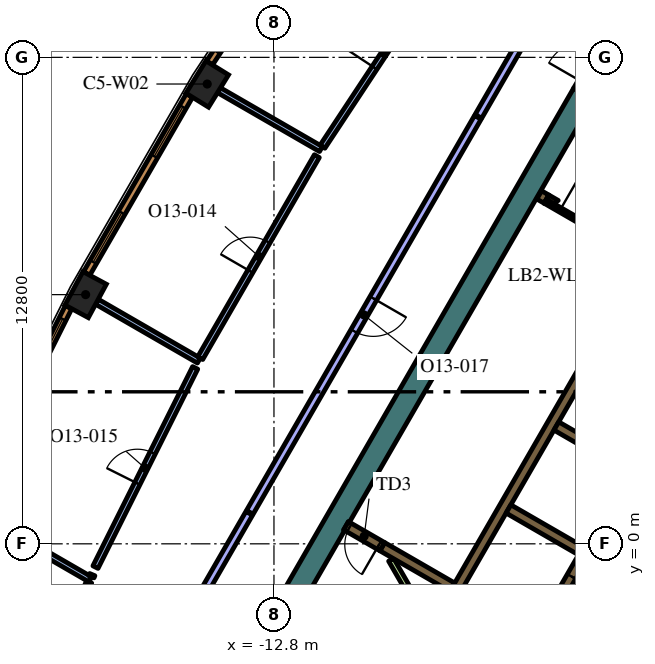
"""IFC4 building model, lengths in metres.
Left out: names, types, materials, properties, quantities, classifications, styles, units other than length and angle.
Written with IfcOpenShell. Run it as: python <this file> out.ifc"""

import sys

from ifc_helpers import new_model, si_unit, direction, frame, frame_2d, origin, origin_2d, place, context, subcontext, project, spatial, polyline, rectangle, outline, extrude, element, fill, save


model = new_model("IFC4")
c1 = context("Model", 3, precision=1e-05, world=origin(), true_north=direction((0.0, 1.0)))
c2 = subcontext(c1, "Body", "Model", "MODEL_VIEW")
j1 = project(units=[si_unit("LENGTHUNIT", "METRE"), si_unit("PLANEANGLEUNIT", "RADIAN")], contexts=[c1])
p1 = place(None, origin())
s1 = spatial("IfcSite", under=j1, at=p1, CompositionType="ELEMENT")
p2 = place(p1, origin())
s2 = spatial("IfcBuilding", under=s1, at=p2, CompositionType="ELEMENT")
p3 = place(p2, frame((0.0, 0.0, 292.2)))
s3 = spatial("IfcBuildingStorey", under=s2, at=p3, CompositionType="ELEMENT", Elevation=292.2)
for number, where, z_axis, x_axis in (
    (1, (-14.556, 12.098, 0.0), (0.0, 0.0, 1.0), (-0.526, -0.851, 0.0)),
    (2, (-17.756, 6.557, 0.0), (0.0, 0.0, 1.0), (-0.474, -0.881, 0.0)),
):
    element("IfcColumn", number, at=place(p3, frame(where, z_axis=z_axis, x_axis=x_axis)), inside=s3, PredefinedType="COLUMN", context=c2, shape_type="SweptSolid", body=[
        extrude(rectangle(XDim=1.0, YDim=0.7, at=origin_2d()), origin(), (0.0, 0.0, 1.0), 4.2),
    ])
p4 = place(p3, origin())
e3 = element("IfcWall", 3, at=p4, inside=s3, PredefinedType="SOLIDWALL", context=c2, shape_type="SweptSolid", body=[
    extrude(outline(polyline([(-15.502, -6.35), (-4.912, 11.992), (-4.393, 11.692), (-10.815, 0.569), (-10.84, 0.583), (-10.84, 0.583), (-10.84, 0.583), (-10.965, 0.367), (-10.965, 0.367), (-10.965, 0.367), (-10.94, 0.352), (-11.033, 0.191), (-14.809, -6.35), (-15.156, -6.95), (-15.502, -6.35)])), origin(), (0.0, 0.0, 1.0), 4.2),
])
p5 = place(p3, frame((-8.06, -1.311, 0.0), z_axis=(0.0, 0.0, 1.0), x_axis=(0.50000273126, 0.866023826885, 0.0)))
e4 = element("IfcWall", 4, at=p5, inside=s3, PredefinedType="SOLIDWALL", context=c2, shape_type="SweptSolid", body=[
    extrude(rectangle(XDim=10.33, YDim=0.25, at=frame_2d((5.165, 0.0))), origin(), (0.0, 0.0, 1.0), 4.2),
])
for number, where, z_axis, x_axis in (
    (5, (-5.369, 3.1, 0.0), (0.0, 0.0, 1.0), (0.866, -0.5, 0.0)),
    (6, (-4.724, -0.182, 0.0), (0.0, 0.0, 1.0), (-0.866, 0.5, 0.0)),
):
    element("IfcWall", number, at=place(p3, frame(where, z_axis=z_axis, x_axis=x_axis)), inside=s3, PredefinedType="SOLIDWALL", context=c2, shape_type="SweptSolid", body=[
        extrude(rectangle(XDim=2.2, YDim=0.25, at=frame_2d((1.1, 0.0))), origin(), (0.0, 0.0, 1.0), 4.2),
    ])
p6 = place(p3, frame((-9.95, -0.075, 0.0), z_axis=(0.0, 0.0, 1.0), x_axis=(0.865962177421, -0.500109495288, 0.0)))
e7 = element("IfcWall", 7, at=p6, inside=s3, PredefinedType="SOLIDWALL", context=c2, shape_type="SweptSolid", body=[
    extrude(rectangle(XDim=2.129, YDim=0.25, at=frame_2d((1.065, 0.0))), origin(), (0.0, 0.0, 1.0), 4.2),
])
p7 = place(p3, frame((-5.629, 9.07, 0.0), z_axis=(0.0, 0.0, 1.0), x_axis=(-0.866185586049, 0.49972245349, 0.0)))
e8 = element("IfcWall", 8, at=p7, inside=s3, PredefinedType="SOLIDWALL", context=c2, shape_type="SweptSolid", body=[
    extrude(rectangle(XDim=0.22, YDim=0.25, at=frame_2d((0.11, 0.0))), origin(), (0.0, 0.0, 1.0), 4.2),
])
e9 = element("IfcWall", 9, at=p4, inside=s3, PredefinedType="SOLIDWALL", context=c2, shape_type="SweptSolid", body=[
    extrude(outline(polyline([(-5.689, 8.96), (-5.69, 8.961), (-5.565, 9.177), (-5.319, 9.035), (-5.335, 9.026), (-5.351, 9.015), (-5.366, 9.002), (-5.379, 8.988), (-5.392, 8.972), (-5.402, 8.956), (-5.412, 8.939), (-5.629, 9.064), (-5.629, 9.064), (-5.689, 8.96)])), origin(), (0.0, 0.0, 1.0), 4.2),
])
p8 = place(p3, frame((-9.718, -0.417, 0.0), z_axis=(0.0, 0.0, 1.0), x_axis=(0.499966538646, -0.866044721844, 0.0)))
e10 = element("IfcWall", 10, at=p8, inside=s3, PredefinedType="PARTITIONING", context=c2, shape_type="SweptSolid", body=[
    extrude(rectangle(XDim=2.511, YDim=0.15, at=frame_2d((1.255, 0.0))), origin(), (0.0, 0.0, 1.0), 3.55),
])
p9 = place(p3, frame((-0.898, 6.194, 0.0), z_axis=(0.0, 0.0, 1.0), x_axis=(-0.499996202215, -0.866027596426, 0.0)))
e11 = element("IfcWall", 11, at=p9, inside=s3, PredefinedType="SOLIDWALL", context=c2, shape_type="SweptSolid", body=[
    extrude(rectangle(XDim=9.83, YDim=0.25, at=frame_2d((4.915, 0.0))), origin(), (0.0, 0.0, 1.0), 4.2),
])
p10 = place(p9, frame((0.585, 0.0, 0.0)))
e12 = element("IfcOpeningElement", 12, at=p10, cuts=e11, PredefinedType="OPENING", context=c2, shape_type="SweptSolid", body=[
    extrude(rectangle(XDim=1.1, YDim=2.1, at=frame_2d((0.55, 1.05))), frame((0.0, 0.135, 0.0), z_axis=(0.0, -1.0, 0.0), x_axis=(1.0, 0.0, 0.0)), (0.0, 0.0, 1.0), 0.27),
])
p11 = place(p9, frame((3.105, 0.0, 0.0)))
e13 = element("IfcOpeningElement", 13, at=p11, cuts=e11, PredefinedType="OPENING", context=c2, shape_type="SweptSolid", body=[
    extrude(rectangle(XDim=1.1, YDim=2.1, at=frame_2d((0.55, 1.05))), frame((0.0, 0.135, 0.0), z_axis=(0.0, -1.0, 0.0), x_axis=(1.0, 0.0, 0.0)), (0.0, 0.0, 1.0), 0.27),
])
p12 = place(p9, frame((5.625, 0.0, 0.0)))
e14 = element("IfcOpeningElement", 14, at=p12, cuts=e11, PredefinedType="OPENING", context=c2, shape_type="SweptSolid", body=[
    extrude(rectangle(XDim=1.1, YDim=2.1, at=frame_2d((0.55, 1.05))), frame((0.0, 0.135, 0.0), z_axis=(0.0, -1.0, 0.0), x_axis=(1.0, 0.0, 0.0)), (0.0, 0.0, 1.0), 0.27),
])
p13 = place(p9, frame((8.145, 0.0, 0.0)))
e15 = element("IfcOpeningElement", 15, at=p13, cuts=e11, PredefinedType="OPENING", context=c2, shape_type="SweptSolid", body=[
    extrude(rectangle(XDim=1.1, YDim=2.1, at=frame_2d((0.55, 1.05))), frame((0.0, 0.135, 0.0), z_axis=(0.0, -1.0, 0.0), x_axis=(1.0, 0.0, 0.0)), (0.0, 0.0, 1.0), 0.27),
])
p14 = place(p3, frame((-5.659, 9.012, 0.0), z_axis=(0.0, 0.0, 1.0), x_axis=(0.866009402589, -0.500027713859, 0.0)))
e16 = element("IfcWall", 16, at=p14, inside=s3, PredefinedType="PARTITIONING", context=c2, shape_type="SweptSolid", body=[
    extrude(rectangle(XDim=2.1, YDim=0.12, at=frame_2d((1.05, 0.0))), origin(), (0.0, 0.0, 1.0), 3.55),
])
p15 = place(p14, frame((0.45, 0.0, 0.0)))
e17 = element("IfcOpeningElement", 17, at=p15, cuts=e16, PredefinedType="OPENING", context=c2, shape_type="SweptSolid", body=[
    extrude(rectangle(XDim=1.2, YDim=2.1, at=frame_2d((0.6, 1.05))), frame((0.0, 0.07, 0.0), z_axis=(0.0, -1.0, 0.0), x_axis=(1.0, 0.0, 0.0)), (0.0, 0.0, 1.0), 0.14),
])
p16 = place(p3, frame((-4.652, 11.842, 0.0), z_axis=(0.0, 0.0, 1.0), x_axis=(0.500062241894, 0.865989465428, 0.0)))
e18 = element("IfcWall", 18, at=p16, inside=s3, PredefinedType="SOLIDWALL", context=c2, shape_type="SweptSolid", body=[
    extrude(rectangle(XDim=1.7, YDim=0.6, at=frame_2d((0.85, 0.0))), origin(), (0.0, 0.0, 1.0), 4.2),
])
p17 = place(p16, frame((0.25, 0.0, 0.0)))
e19 = element("IfcOpeningElement", 19, at=p17, cuts=e18, PredefinedType="OPENING", context=c2, shape_type="SweptSolid", body=[
    extrude(rectangle(XDim=1.2, YDim=2.1, at=frame_2d((0.6, 1.05))), frame((0.0, 0.31, 0.0), z_axis=(0.0, -1.0, 0.0), x_axis=(1.0, 0.0, 0.0)), (0.0, 0.0, 1.0), 0.62),
])
p18 = place(p3, frame((-9.95, -0.075, 0.0), z_axis=(0.0, 0.0, 1.0), x_axis=(-0.865952669392, 0.500125958508, 0.0)))
e20 = element("IfcWall", 20, at=p18, inside=s3, PredefinedType="SOLIDWALL", context=c2, shape_type="SweptSolid", body=[
    extrude(rectangle(XDim=1.1, YDim=0.25, at=frame_2d((0.55, 0.0))), origin(), (0.0, 0.0, 1.0), 4.2),
])
p19 = place(p18, frame((0.1, 0.0, 0.0)))
e21 = element("IfcOpeningElement", 21, at=p19, cuts=e20, PredefinedType="OPENING", context=c2, shape_type="SweptSolid", body=[
    extrude(rectangle(XDim=0.9, YDim=2.1, at=frame_2d((0.45, 1.05))), frame((0.0, 0.135, 0.0), z_axis=(0.0, -1.0, 0.0), x_axis=(1.0, 0.0, 0.0)), (0.0, 0.0, 1.0), 0.27),
])
p20 = place(p3, frame((-11.564, 10.387, 0.0), z_axis=(0.0, 0.0, 1.0), x_axis=(-0.86604641216, 0.499963610661, 0.0)))
e22 = element("IfcWall", 22, at=p20, inside=s3, PredefinedType="PARTITIONING", context=c2, shape_type="SweptSolid", body=[
    extrude(rectangle(XDim=3.096, YDim=0.15, at=frame_2d((1.548, 0.0))), origin(), (0.0, 0.0, 1.0), 3.55),
])
p21 = place(p3, frame((-11.523, 10.449, 0.0), z_axis=(0.0, 0.0, 1.0), x_axis=(0.550751709023, 0.834669129061, 0.0)))
e23 = element("IfcWall", 23, at=p21, inside=s3, PredefinedType="PARTITIONING", context=c2, shape_type="SweptSolid", body=[
    extrude(rectangle(XDim=5.788, YDim=0.15, at=frame_2d((2.894, 0.0))), origin(), (0.0, 0.0, 1.0), 3.55),
])
p22 = place(p21, frame((2.488, 0.0, 0.0)))
e24 = element("IfcOpeningElement", 24, at=p22, cuts=e23, PredefinedType="OPENING", context=c2, shape_type="SweptSolid", body=[
    extrude(rectangle(XDim=0.9, YDim=2.1, at=frame_2d((0.45, 1.05))), frame((0.0, 0.085, 0.0), z_axis=(0.0, -1.0, 0.0), x_axis=(1.0, 0.0, 0.0)), (0.0, 0.0, 1.0), 0.17),
])
p23 = place(p3, frame((-14.777, 4.822, 0.0), z_axis=(0.0, 0.0, 1.0), x_axis=(-0.865992557167, 0.500056887695, 0.0)))
e25 = element("IfcWall", 25, at=p23, inside=s3, PredefinedType="PARTITIONING", context=c2, shape_type="SweptSolid", body=[
    extrude(rectangle(XDim=3.096, YDim=0.15, at=frame_2d((1.548, 0.0))), origin(), (0.0, 0.0, 1.0), 3.55),
])
p24 = place(p3, frame((-14.74, 4.887, 0.0), z_axis=(0.0, 0.0, 1.0), x_axis=(0.500007141444, 0.86602128063, 0.0)))
e26 = element("IfcWall", 26, at=p24, inside=s3, PredefinedType="PARTITIONING", context=c2, shape_type="SweptSolid", body=[
    extrude(rectangle(XDim=6.137, YDim=0.15, at=frame_2d((3.068, 0.0))), origin(), (0.0, 0.0, 1.0), 3.55),
])
p25 = place(p24, frame((2.637, 0.0, 0.0)))
e27 = element("IfcOpeningElement", 27, at=p25, cuts=e26, PredefinedType="OPENING", context=c2, shape_type="SweptSolid", body=[
    extrude(rectangle(XDim=0.9, YDim=2.1, at=frame_2d((0.45, 1.05))), frame((0.0, 0.085, 0.0), z_axis=(0.0, -1.0, 0.0), x_axis=(1.0, 0.0, 0.0)), (0.0, 0.0, 1.0), 0.17),
])
p26 = place(p3, frame((-17.635, -0.936, 0.0), z_axis=(0.0, 0.0, 1.0), x_axis=(-0.866044607523, 0.499966736674, 0.0)))
e28 = element("IfcWall", 28, at=p26, inside=s3, PredefinedType="PARTITIONING", context=c2, shape_type="SweptSolid", body=[
    extrude(rectangle(XDim=3.115, YDim=0.15, at=frame_2d((1.557, 0.0))), origin(), (0.0, 0.0, 1.0), 3.55),
])
p27 = place(p3, frame((-17.497, -0.613, 0.0), z_axis=(0.0, 0.0, 1.0), x_axis=(0.447480081559, 0.89429389834, 0.0)))
e29 = element("IfcWall", 29, at=p27, inside=s3, PredefinedType="PARTITIONING", context=c2, shape_type="SweptSolid", body=[
    extrude(rectangle(XDim=5.863, YDim=0.15, at=frame_2d((2.931, 0.0))), origin(), (0.0, 0.0, 1.0), 3.55),
])
p28 = place(p27, frame((2.463, 0.0, 0.0)))
e30 = element("IfcOpeningElement", 30, at=p28, cuts=e29, PredefinedType="OPENING", context=c2, shape_type="SweptSolid", body=[
    extrude(rectangle(XDim=0.9, YDim=2.1, at=frame_2d((0.45, 1.05))), frame((0.0, 0.085, 0.0), z_axis=(0.0, -1.0, 0.0), x_axis=(1.0, 0.0, 0.0)), (0.0, 0.0, 1.0), 0.17),
])
p29 = place(p3, frame((-17.581, -0.81, 0.0), z_axis=(0.0, 0.0, 1.0), x_axis=(-0.390033474923, -0.92080067791, 0.0)))
e31 = element("IfcWall", 31, at=p29, inside=s3, PredefinedType="PARTITIONING", context=c2, shape_type="SweptSolid", body=[
    extrude(rectangle(XDim=0.061, YDim=0.15, at=frame_2d((0.03, 0.0))), origin(), (0.0, 0.0, 1.0), 3.55),
])
p30 = place(p3, frame((-19.639, -5.62, 0.0), z_axis=(0.0, 0.0, 1.0), x_axis=(0.393349802257, 0.919388891092, 0.0)))
e32 = element("IfcWall", 32, at=p30, inside=s3, PredefinedType="PARTITIONING", context=c2, shape_type="SweptSolid", body=[
    extrude(rectangle(XDim=5.019, YDim=0.15, at=frame_2d((2.51, 0.0))), origin(), (0.0, 0.0, 1.0), 3.55),
])
p31 = place(p30, frame((2.019, 0.0, 0.0)))
e33 = element("IfcOpeningElement", 33, at=p31, cuts=e32, PredefinedType="OPENING", context=c2, shape_type="SweptSolid", body=[
    extrude(rectangle(XDim=0.9, YDim=2.1, at=frame_2d((0.45, 1.05))), frame((0.0, 0.085, 0.0), z_axis=(0.0, -1.0, 0.0), x_axis=(1.0, 0.0, 0.0)), (0.0, 0.0, 1.0), 0.17),
])
p32 = place(p3, frame((-7.436, 11.221, 0.0), z_axis=(0.0, 0.0, 1.0), x_axis=(-0.49999894854, -0.866026010844, 0.0)))
e34 = element("IfcWall", 34, at=p32, inside=s3, PredefinedType="PARTITIONING", context=c2, shape_type="SweptSolid", body=[
    extrude(rectangle(XDim=12.0, YDim=0.2, at=frame_2d((6.0, 0.0))), origin(), (0.0, 0.0, 1.0), 3.55),
])
p33 = place(p32, frame((5.5, 0.0, 0.0)))
e35 = element("IfcOpeningElement", 35, at=p33, cuts=e34, PredefinedType="OPENING", context=c2, shape_type="SweptSolid", body=[
    extrude(rectangle(XDim=1.0, YDim=2.1, at=frame_2d((0.5, 1.05))), frame((0.0, 0.11, 0.0), z_axis=(0.0, -1.0, 0.0), x_axis=(1.0, 0.0, 0.0)), (0.0, 0.0, 1.0), 0.22),
])
p34 = place(p3, frame((-13.451, 0.803, 0.0), z_axis=(0.0, 0.0, 1.0), x_axis=(-0.499979102685, -0.866037468519, 0.0)))
e36 = element("IfcWall", 36, at=p34, inside=s3, PredefinedType="PARTITIONING", context=c2, shape_type="SweptSolid", body=[
    extrude(rectangle(XDim=7.795, YDim=0.2, at=frame_2d((3.897, 0.0))), origin(), (0.0, 0.0, 1.0), 3.55),
])
p35 = place(p3, frame((-3.306, 18.374, 0.0), z_axis=(0.0, 0.0, 1.0), x_axis=(-0.499999798456, -0.866025520146, 0.0)))
e37 = element("IfcWall", 37, at=p35, inside=s3, PredefinedType="PARTITIONING", context=c2, shape_type="SweptSolid", body=[
    extrude(rectangle(XDim=8.229, YDim=0.2, at=frame_2d((4.115, 0.0))), origin(), (0.0, 0.0, 1.0), 3.55),
])
p36 = place(p3, frame((-11.518, 17.166, 0.0), z_axis=(0.0, 0.0, 1.0), x_axis=(-0.550744054781, -0.83467417962, 0.0)))
e38 = element("IfcWall", 38, at=p36, inside=s3, PredefinedType="SOLIDWALL", context=c2, shape_type="SweptSolid", body=[
    extrude(rectangle(XDim=5.406, YDim=0.19, at=frame_2d((2.703, 0.0))), origin(), (0.0, 0.0, 1.0), 3.95),
])
p37 = place(p36, frame((0.346, 0.0, 0.6)))
e39 = element("IfcOpeningElement", 39, at=p37, cuts=e38, PredefinedType="OPENING", context=c2, shape_type="SweptSolid", body=[
    extrude(rectangle(XDim=1.5, YDim=2.85, at=frame_2d((0.75, 1.425))), frame((0.0, 0.105, 0.0), z_axis=(0.0, -1.0, 0.0), x_axis=(1.0, 0.0, 0.0)), (0.0, 0.0, 1.0), 0.21),
])
p38 = place(p36, frame((3.559, 0.0, 0.6)))
e40 = element("IfcOpeningElement", 40, at=p38, cuts=e38, PredefinedType="OPENING", context=c2, shape_type="SweptSolid", body=[
    extrude(rectangle(XDim=1.5, YDim=2.85, at=frame_2d((0.75, 1.425))), frame((0.0, 0.105, 0.0), z_axis=(0.0, -1.0, 0.0), x_axis=(1.0, 0.0, 0.0)), (0.0, 0.0, 1.0), 0.21),
])
p39 = place(p3, frame((-15.025, 11.796, 0.0), z_axis=(0.0, 0.0, 1.0), x_axis=(-0.500024767483, -0.866011103799, 0.0)))
e41 = element("IfcWall", 41, at=p39, inside=s3, PredefinedType="SOLIDWALL", context=c2, shape_type="SweptSolid", body=[
    extrude(rectangle(XDim=5.406, YDim=0.19, at=frame_2d((2.703, 0.0))), origin(), (0.0, 0.0, 1.0), 3.95),
])
p40 = place(p39, frame((0.346, 0.0, 0.6)))
e42 = element("IfcOpeningElement", 42, at=p40, cuts=e41, PredefinedType="OPENING", context=c2, shape_type="SweptSolid", body=[
    extrude(rectangle(XDim=1.5, YDim=2.85, at=frame_2d((0.75, 1.425))), frame((0.0, 0.105, 0.0), z_axis=(0.0, -1.0, 0.0), x_axis=(1.0, 0.0, 0.0)), (0.0, 0.0, 1.0), 0.21),
])
p41 = place(p39, frame((3.559, 0.0, 0.6)))
e43 = element("IfcOpeningElement", 43, at=p41, cuts=e41, PredefinedType="OPENING", context=c2, shape_type="SweptSolid", body=[
    extrude(rectangle(XDim=1.5, YDim=2.85, at=frame_2d((0.75, 1.425))), frame((0.0, 0.105, 0.0), z_axis=(0.0, -1.0, 0.0), x_axis=(1.0, 0.0, 0.0)), (0.0, 0.0, 1.0), 0.21),
])
p42 = place(p3, frame((-18.206, 6.227, 0.0), z_axis=(0.0, 0.0, 1.0), x_axis=(-0.447484531401, -0.894291671747, 0.0)))
e44 = element("IfcWall", 44, at=p42, inside=s3, PredefinedType="SOLIDWALL", context=c2, shape_type="SweptSolid", body=[
    extrude(rectangle(XDim=5.406, YDim=0.19, at=frame_2d((2.703, 0.0))), origin(), (0.0, 0.0, 1.0), 3.95),
])
p43 = place(p42, frame((0.346, 0.0, 0.6)))
e45 = element("IfcOpeningElement", 45, at=p43, cuts=e44, PredefinedType="OPENING", context=c2, shape_type="SweptSolid", body=[
    extrude(rectangle(XDim=1.5, YDim=2.85, at=frame_2d((0.75, 1.425))), frame((0.0, 0.105, 0.0), z_axis=(0.0, -1.0, 0.0), x_axis=(1.0, 0.0, 0.0)), (0.0, 0.0, 1.0), 0.21),
])
p44 = place(p42, frame((3.559, 0.0, 0.6)))
e46 = element("IfcOpeningElement", 46, at=p44, cuts=e44, PredefinedType="OPENING", context=c2, shape_type="SweptSolid", body=[
    extrude(rectangle(XDim=1.5, YDim=2.85, at=frame_2d((0.75, 1.425))), frame((0.0, 0.105, 0.0), z_axis=(0.0, -1.0, 0.0), x_axis=(1.0, 0.0, 0.0)), (0.0, 0.0, 1.0), 0.21),
])
p45 = place(p13, origin())
e47 = element("IfcDoor", 47, at=p45, inside=s3, OperationType="DOUBLE_DOOR_SLIDING", PredefinedType="DOOR", context=c2, shape_type="SweptSolid", body=[
    extrude(rectangle(XDim=1.1, YDim=2.1, at=frame_2d((0.55, 1.05))), frame((0.0, 0.025, 0.0), z_axis=(0.0, -1.0, 0.0), x_axis=(1.0, 0.0, 0.0)), (0.0, 0.0, 1.0), 0.05),
])
fill(e15, e47)
p46 = place(p15, origin())
e48 = element("IfcDoor", 48, at=p46, inside=s3, OperationType="SINGLE_SWING_LEFT", PredefinedType="DOOR", context=c2, shape_type="SweptSolid", body=[
    extrude(rectangle(XDim=1.2, YDim=2.1, at=frame_2d((0.6, 1.05))), frame((0.0, 0.025, 0.0), z_axis=(0.0, -1.0, 0.0), x_axis=(1.0, 0.0, 0.0)), (0.0, 0.0, 1.0), 0.05),
])
fill(e17, e48)
p47 = place(p19, origin())
e49 = element("IfcDoor", 49, at=p47, inside=s3, OperationType="SINGLE_SWING_LEFT", PredefinedType="DOOR", context=c2, shape_type="SweptSolid", body=[
    extrude(rectangle(XDim=0.9, YDim=2.1, at=frame_2d((0.45, 1.05))), frame((0.0, 0.025, 0.0), z_axis=(0.0, -1.0, 0.0), x_axis=(1.0, 0.0, 0.0)), (0.0, 0.0, 1.0), 0.05),
])
fill(e21, e49)
p48 = place(p22, origin())
e50 = element("IfcDoor", 50, at=p48, inside=s3, OperationType="SINGLE_SWING_RIGHT", PredefinedType="DOOR", context=c2, shape_type="SweptSolid", body=[
    extrude(rectangle(XDim=0.9, YDim=2.1, at=frame_2d((0.45, 1.05))), frame((0.0, 0.025, 0.0), z_axis=(0.0, -1.0, 0.0), x_axis=(1.0, 0.0, 0.0)), (0.0, 0.0, 1.0), 0.05),
])
fill(e24, e50)
p49 = place(p25, origin())
e51 = element("IfcDoor", 51, at=p49, inside=s3, OperationType="SINGLE_SWING_RIGHT", PredefinedType="DOOR", context=c2, shape_type="SweptSolid", body=[
    extrude(rectangle(XDim=0.9, YDim=2.1, at=frame_2d((0.45, 1.05))), frame((0.0, 0.025, 0.0), z_axis=(0.0, -1.0, 0.0), x_axis=(1.0, 0.0, 0.0)), (0.0, 0.0, 1.0), 0.05),
])
fill(e27, e51)
p50 = place(p28, origin())
e52 = element("IfcDoor", 52, at=p50, inside=s3, OperationType="SINGLE_SWING_LEFT", PredefinedType="DOOR", context=c2, shape_type="SweptSolid", body=[
    extrude(rectangle(XDim=0.9, YDim=2.1, at=frame_2d((0.45, 1.05))), frame((0.0, 0.025, 0.0), z_axis=(0.0, -1.0, 0.0), x_axis=(1.0, 0.0, 0.0)), (0.0, 0.0, 1.0), 0.05),
])
fill(e30, e52)
p51 = place(p33, origin())
e53 = element("IfcDoor", 53, at=p51, inside=s3, OperationType="SINGLE_SWING_RIGHT", PredefinedType="DOOR", context=c2, shape_type="SweptSolid", body=[
    extrude(rectangle(XDim=1.0, YDim=2.1, at=frame_2d((0.5, 1.05))), frame((0.0, 0.025, 0.0), z_axis=(0.0, -1.0, 0.0), x_axis=(1.0, 0.0, 0.0)), (0.0, 0.0, 1.0), 0.05),
])
fill(e35, e53)
p52 = place(p38, origin())
e54 = element("IfcWindow", 54, at=p52, inside=s3, PartitioningType="SINGLE_PANEL", PredefinedType="WINDOW", context=c2, shape_type="SweptSolid", body=[
    extrude(rectangle(XDim=1.5, YDim=2.85, at=frame_2d((0.75, 1.425))), frame((0.0, 0.045, 0.0), z_axis=(0.0, -1.0, 0.0), x_axis=(1.0, 0.0, 0.0)), (0.0, 0.0, 1.0), 0.06),
])
fill(e40, e54)
p53 = place(p40, origin())
e55 = element("IfcWindow", 55, at=p53, inside=s3, PartitioningType="SINGLE_PANEL", PredefinedType="WINDOW", context=c2, shape_type="SweptSolid", body=[
    extrude(rectangle(XDim=1.5, YDim=2.85, at=frame_2d((0.75, 1.425))), frame((0.0, 0.045, 0.0), z_axis=(0.0, -1.0, 0.0), x_axis=(1.0, 0.0, 0.0)), (0.0, 0.0, 1.0), 0.06),
])
fill(e42, e55)
p54 = place(p41, origin())
e56 = element("IfcWindow", 56, at=p54, inside=s3, PartitioningType="SINGLE_PANEL", PredefinedType="WINDOW", context=c2, shape_type="SweptSolid", body=[
    extrude(rectangle(XDim=1.5, YDim=2.85, at=frame_2d((0.75, 1.425))), frame((0.0, 0.045, 0.0), z_axis=(0.0, -1.0, 0.0), x_axis=(1.0, 0.0, 0.0)), (0.0, 0.0, 1.0), 0.06),
])
fill(e43, e56)
p55 = place(p43, origin())
e57 = element("IfcWindow", 57, at=p55, inside=s3, PartitioningType="SINGLE_PANEL", PredefinedType="WINDOW", context=c2, shape_type="SweptSolid", body=[
    extrude(rectangle(XDim=1.5, YDim=2.85, at=frame_2d((0.75, 1.425))), frame((0.0, 0.045, 0.0), z_axis=(0.0, -1.0, 0.0), x_axis=(1.0, 0.0, 0.0)), (0.0, 0.0, 1.0), 0.06),
])
fill(e45, e57)
save(model, sys.argv[1])
